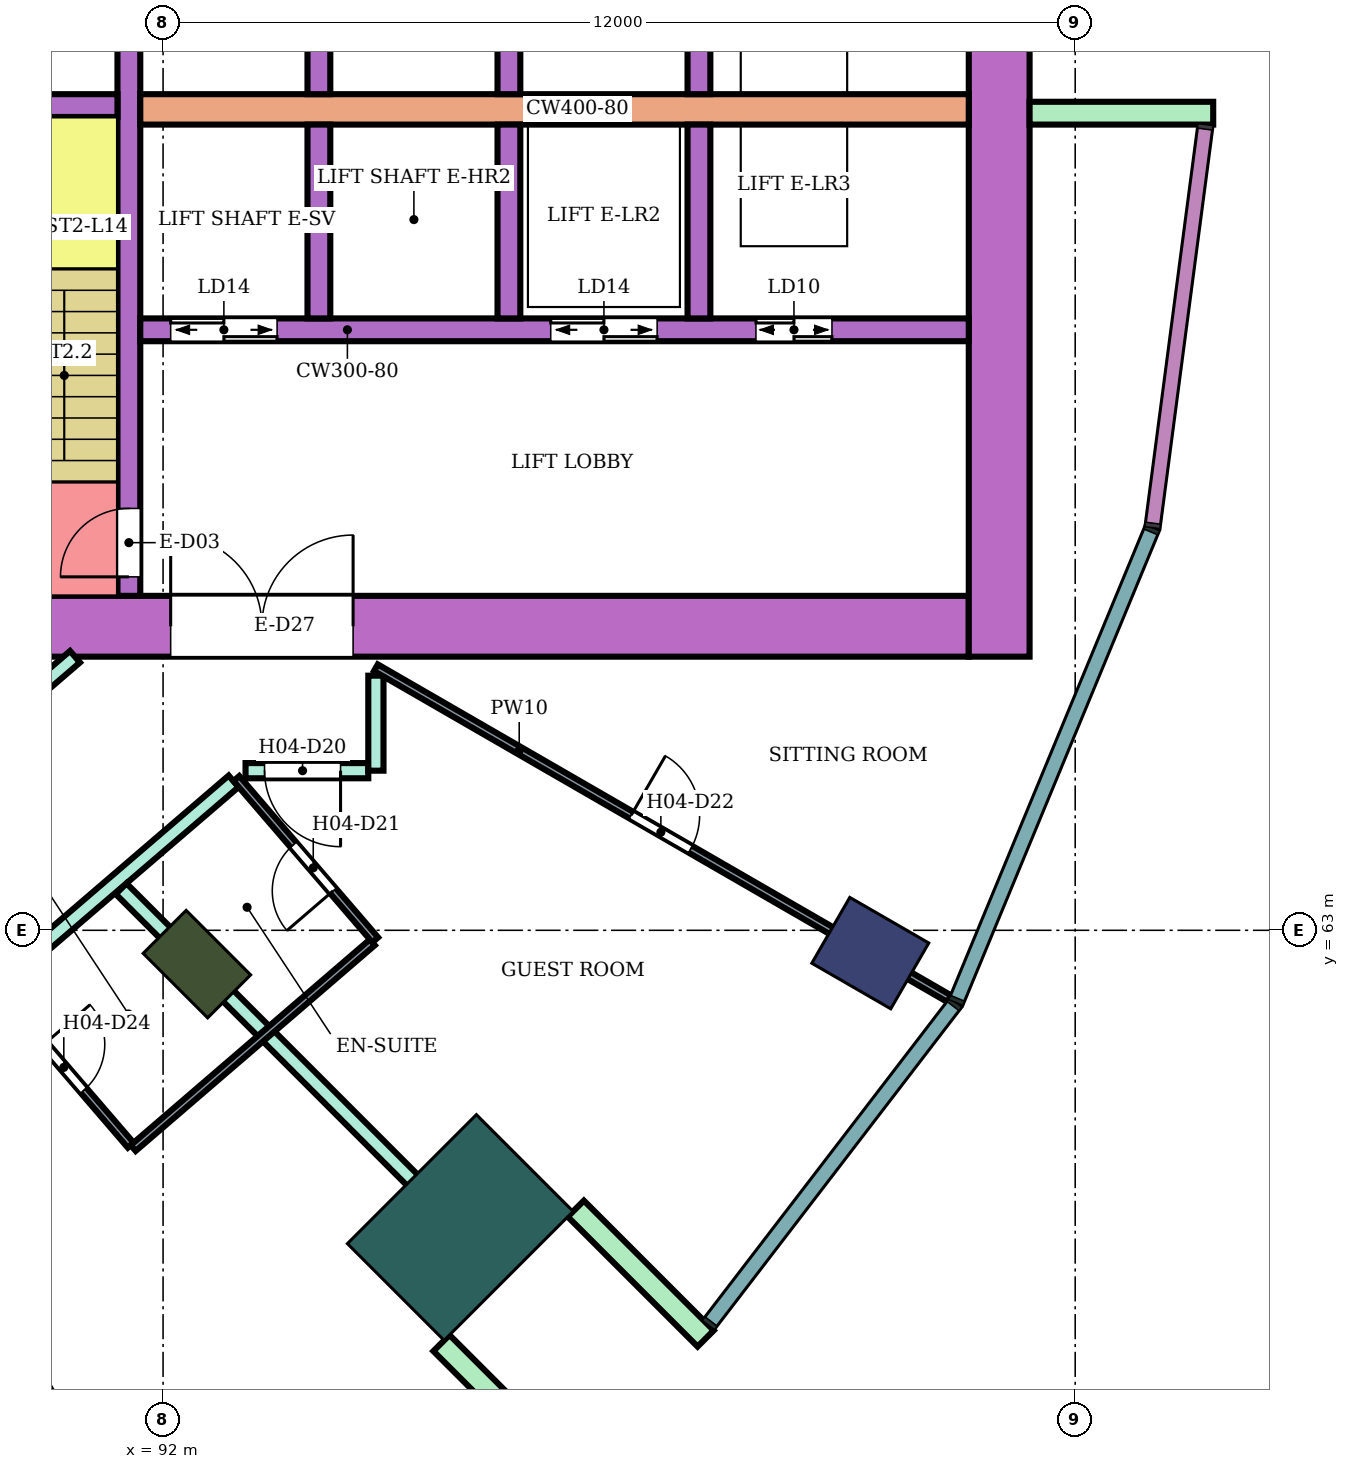
"""IFC4 building model, lengths in metres.
Left out: names, types, materials, properties, quantities, classifications, styles, units other than length and angle.
Written with IfcOpenShell. Run it as: python <this file> out.ifc"""

import sys

from ifc_helpers import new_model, si_unit, direction, frame, frame_2d, origin, origin_2d, place, context, subcontext, project, spatial, rectangle, extrude, element, fill, save


model = new_model("IFC4")
c1 = context("Model", 3, precision=1e-05, world=origin(), true_north=direction((0.0, 1.0)))
c2 = subcontext(c1, "Body", "Model", "MODEL_VIEW")
j1 = project(units=[si_unit("LENGTHUNIT", "METRE"), si_unit("PLANEANGLEUNIT", "RADIAN")], contexts=[c1])
p1 = place(None, origin())
s1 = spatial("IfcSite", under=j1, at=p1, CompositionType="ELEMENT")
p2 = place(p1, origin())
s2 = spatial("IfcBuilding", under=s1, at=p2, CompositionType="ELEMENT")
p3 = place(p2, frame((0.0, 0.0, 63.0)))
s3 = spatial("IfcBuildingStorey", under=s2, at=p3, CompositionType="ELEMENT", Elevation=63.0)
p4 = place(p3, frame((101.304, 62.7, 0.0), z_axis=(0.0, 0.0, 1.0), x_axis=(0.866025403784, -0.5, 0.0)))
e1 = element("IfcColumn", 1, at=p4, inside=s3, PredefinedType="COLUMN", context=c2, shape_type="SweptSolid", body=[
    extrude(rectangle(XDim=1.2, YDim=1.0, at=origin_2d()), origin(), (0.0, 0.0, 1.0), 3.8),
])
p5 = place(p3, frame((92.445, 62.555, 0.0), z_axis=(0.0, 0.0, 1.0), x_axis=(0.707106781187, -0.707106781187, 0.0)))
e2 = element("IfcColumn", 2, at=p5, inside=s3, PredefinedType="COLUMN", context=c2, shape_type="SweptSolid", body=[
    extrude(rectangle(XDim=1.2, YDim=0.8, at=origin_2d()), origin(), (0.0, 0.0, 1.0), 3.8),
])
p6 = place(p3, frame((95.91, 59.09, 0.0), z_axis=(0.0, 0.0, 1.0), x_axis=(0.707106781187, -0.707106781187, 0.0)))
e3 = element("IfcColumn", 3, at=p6, inside=s3, PredefinedType="COLUMN", context=c2, shape_type="SweptSolid", body=[
    extrude(rectangle(XDim=1.8, YDim=2.4, at=origin_2d()), origin(), (0.0, 0.0, 1.0), 3.8),
])
p7 = place(p3, frame((87.9, 67.0, 0.0), z_axis=(0.0, 0.0, 1.0), x_axis=(1.0, 0.0, 0.0)))
e4 = element("IfcWall", 4, at=p7, inside=s3, PredefinedType="SHEAR", context=c2, shape_type="SweptSolid", body=[
    extrude(rectangle(XDim=14.7, YDim=0.8, at=frame_2d((7.35, 0.0))), origin(), (0.0, 0.0, 1.0), 3.48),
])
p8 = place(p7, frame((4.2, 0.0, 0.0)))
e5 = element("IfcOpeningElement", 5, at=p8, cuts=e4, PredefinedType="OPENING", context=c2, shape_type="SweptSolid", body=[
    extrude(rectangle(XDim=2.4, YDim=2.4, at=frame_2d((1.2, 1.2))), frame((0.0, 0.41, 0.0), z_axis=(0.0, -1.0, 0.0), x_axis=(1.0, 0.0, 0.0)), (0.0, 0.0, 1.0), 0.82),
])
p9 = place(p3, frame((103.0, 66.6, 0.0), z_axis=(0.0, 0.0, 1.0), x_axis=(0.0, 1.0, 0.0)))
e6 = element("IfcWall", 6, at=p9, inside=s3, PredefinedType="SHEAR", context=c2, shape_type="SweptSolid", body=[
    extrude(rectangle(XDim=16.8, YDim=0.8, at=frame_2d((8.4, 0.0))), origin(), (0.0, 0.0, 1.0), 3.48),
])
p10 = place(p3, frame((91.55, 67.4, 0.0), z_axis=(0.0, 0.0, 1.0), x_axis=(0.0, 1.0, 0.0)))
e7 = element("IfcWall", 7, at=p10, inside=s3, PredefinedType="SHEAR", context=c2, shape_type="SweptSolid", body=[
    extrude(rectangle(XDim=7.6, YDim=0.3, at=frame_2d((3.8, 0.0))), origin(), (0.0, 0.0, 1.0), 3.48),
])
p11 = place(p10, frame((0.25, 0.0, 0.0)))
e8 = element("IfcOpeningElement", 8, at=p11, cuts=e7, PredefinedType="OPENING", context=c2, shape_type="SweptSolid", body=[
    extrude(rectangle(XDim=0.9, YDim=2.1, at=frame_2d((0.45, 1.05))), frame((0.0, 0.16, 0.0), z_axis=(0.0, -1.0, 0.0), x_axis=(1.0, 0.0, 0.0)), (0.0, 0.0, 1.0), 0.32),
])
p12 = place(p3, frame((88.35, 73.85, 0.0), z_axis=(0.0, 0.0, 1.0), x_axis=(1.0, 0.0, 0.0)))
e9 = element("IfcWall", 9, at=p12, inside=s3, PredefinedType="SHEAR", context=c2, shape_type="SweptSolid", body=[
    extrude(rectangle(XDim=3.05, YDim=0.3, at=frame_2d((1.525, 0.0))), origin(), (0.0, 0.0, 1.0), 3.48),
])
p13 = place(p3, frame((91.7, 73.8, 0.0), z_axis=(0.0, 0.0, 1.0), x_axis=(1.0, 0.0, 0.0)))
e10 = element("IfcWall", 10, at=p13, inside=s3, PredefinedType="SHEAR", context=c2, shape_type="SweptSolid", body=[
    extrude(rectangle(XDim=10.9, YDim=0.4, at=frame_2d((5.45, 0.0))), origin(), (0.0, 0.0, 1.0), 3.48),
])
p14 = place(p3, frame((91.7, 70.9, 0.0), z_axis=(0.0, 0.0, 1.0), x_axis=(1.0, 0.0, 0.0)))
e11 = element("IfcWall", 11, at=p14, inside=s3, PredefinedType="SHEAR", context=c2, shape_type="SweptSolid", body=[
    extrude(rectangle(XDim=10.9, YDim=0.3, at=frame_2d((5.45, 0.0))), origin(), (0.0, 0.0, 1.0), 3.48),
])
p15 = place(p14, frame((0.4, 0.0, 0.0)))
e12 = element("IfcOpeningElement", 12, at=p15, cuts=e11, PredefinedType="OPENING", context=c2, shape_type="SweptSolid", body=[
    extrude(rectangle(XDim=1.4, YDim=2.1, at=frame_2d((0.7, 1.05))), frame((0.0, 0.16, 0.0), z_axis=(0.0, -1.0, 0.0), x_axis=(1.0, 0.0, 0.0)), (0.0, 0.0, 1.0), 0.32),
])
p16 = place(p14, frame((5.4, 0.0, 0.0)))
e13 = element("IfcOpeningElement", 13, at=p16, cuts=e11, PredefinedType="OPENING", context=c2, shape_type="SweptSolid", body=[
    extrude(rectangle(XDim=1.4, YDim=2.1, at=frame_2d((0.7, 1.05))), frame((0.0, 0.16, 0.0), z_axis=(0.0, -1.0, 0.0), x_axis=(1.0, 0.0, 0.0)), (0.0, 0.0, 1.0), 0.32),
])
p17 = place(p14, frame((8.1, 0.0, 0.0)))
e14 = element("IfcOpeningElement", 14, at=p17, cuts=e11, PredefinedType="OPENING", context=c2, shape_type="SweptSolid", body=[
    extrude(rectangle(XDim=1.0, YDim=2.1, at=frame_2d((0.5, 1.05))), frame((0.0, 0.16, 0.0), z_axis=(0.0, -1.0, 0.0), x_axis=(1.0, 0.0, 0.0)), (0.0, 0.0, 1.0), 0.32),
])
for number, where, z_axis, x_axis in (
    (15, (94.05, 74.0, 0.0), (0.0, 0.0, 1.0), (0.0, 1.0, 0.0)),
    (16, (96.55, 74.0, 0.0), (0.0, 0.0, 1.0), (0.0, 1.0, 0.0)),
    (17, (99.05, 74.0, 0.0), (0.0, 0.0, 1.0), (0.0, 1.0, 0.0)),
    (18, (94.05, 71.05, 0.0), (0.0, 0.0, 1.0), (0.0, 1.0, 0.0)),
    (19, (96.55, 71.05, 0.0), (0.0, 0.0, 1.0), (0.0, 1.0, 0.0)),
    (20, (99.05, 71.05, 0.0), (0.0, 0.0, 1.0), (0.0, 1.0, 0.0)),
):
    element("IfcWall", number, at=place(p3, frame(where, z_axis=z_axis, x_axis=x_axis)), inside=s3, PredefinedType="SHEAR", context=c2, shape_type="SweptSolid", body=[
        extrude(rectangle(XDim=2.55, YDim=0.3, at=frame_2d((1.275, 0.0))), origin(), (0.0, 0.0, 1.0), 3.48),
    ])
for number, where, z_axis, x_axis in (
    (21, (103.4, 73.75, 0.0), (0.0, 0.0, 1.0), (1.0, 0.0, 0.0)),
    (22, (95.662, 57.57, 0.0), (0.0, 0.0, 1.0), (0.707, -0.707, 0.0)),
    (23, (97.43, 59.338, 0.0), (0.0, 0.0, 1.0), (0.707, -0.707, 0.0)),
):
    element("IfcWall", number, at=place(p3, frame(where, z_axis=z_axis, x_axis=x_axis)), inside=s3, PredefinedType="NOTDEFINED", context=c2, shape_type="SweptSolid", body=[
        extrude(rectangle(XDim=2.416, YDim=0.3, at=frame_2d((1.208, 0.0))), origin(), (0.0, 0.0, 1.0), 3.8),
    ])
p18 = place(p3, frame((86.877, 63.189, 0.0), z_axis=(0.0, 0.0, 1.0), x_axis=(0.758088707506, 0.652151448325, 0.0)))
e24 = element("IfcWall", 24, at=p18, inside=s3, PredefinedType="PARTITIONING", context=c2, shape_type="SweptSolid", body=[
    extrude(rectangle(XDim=5.229, YDim=0.2, at=frame_2d((2.615, 0.0))), origin(), (0.0, 0.0, 1.0), 3.35),
])
p19 = place(p3, frame((88.235, 60.931, 0.0), z_axis=(0.0, 0.0, 1.0), x_axis=(0.758799498714, 0.651324282329, 0.0)))
e25 = element("IfcWall", 25, at=p19, inside=s3, PredefinedType="PARTITIONING", context=c2, shape_type="SweptSolid", body=[
    extrude(rectangle(XDim=6.186, YDim=0.2, at=frame_2d((3.093, 0.0))), origin(), (0.0, 0.0, 1.0), 3.35),
])
p20 = place(p19, frame((0.43, 0.0, 0.0)))
e26 = element("IfcOpeningElement", 26, at=p20, cuts=e25, PredefinedType="OPENING", context=c2, shape_type="SweptSolid", body=[
    extrude(rectangle(XDim=1.0, YDim=2.1, at=frame_2d((0.5, 1.05))), frame((0.0, 0.11, 0.0), z_axis=(0.0, -1.0, 0.0), x_axis=(1.0, 0.0, 0.0)), (0.0, 0.0, 1.0), 0.22),
])
p21 = place(p3, frame((88.159, 60.863, 0.0), z_axis=(0.0, 0.0, 1.0), x_axis=(0.499935840196, -0.866062443296, 0.0)))
e27 = element("IfcWall", 27, at=p21, inside=s3, PredefinedType="PARTITIONING", context=c2, shape_type="SweptSolid", body=[
    extrude(rectangle(XDim=9.475, YDim=0.2, at=frame_2d((4.737, 0.0))), origin(), (0.0, 0.0, 1.0), 3.35),
])
p22 = place(p3, frame((91.448, 63.547, 0.0), z_axis=(0.0, 0.0, 1.0), x_axis=(0.706984810649, -0.707228730688, 0.0)))
e28 = element("IfcWall", 28, at=p22, inside=s3, PredefinedType="PARTITIONING", context=c2, shape_type="SweptSolid", body=[
    extrude(rectangle(XDim=7.006, YDim=0.2, at=frame_2d((3.503, 0.0))), origin(), (0.0, 0.0, 1.0), 3.35),
])
p23 = place(p3, frame((93.085, 65.1, 0.0), z_axis=(0.0, 0.0, 1.0), x_axis=(1.0, 0.0, 0.0)))
e29 = element("IfcWall", 29, at=p23, inside=s3, PredefinedType="PARTITIONING", context=c2, shape_type="SweptSolid", body=[
    extrude(rectangle(XDim=1.615, YDim=0.2, at=frame_2d((0.808, 0.0))), origin(), (0.0, 0.0, 1.0), 3.35),
])
p24 = place(p23, frame((0.25, 0.0, 0.0)))
e30 = element("IfcOpeningElement", 30, at=p24, cuts=e29, PredefinedType="OPENING", context=c2, shape_type="SweptSolid", body=[
    extrude(rectangle(XDim=1.0, YDim=2.1, at=frame_2d((0.5, 1.05))), frame((0.0, 0.11, 0.0), z_axis=(0.0, -1.0, 0.0), x_axis=(1.0, 0.0, 0.0)), (0.0, 0.0, 1.0), 0.22),
])
p25 = place(p3, frame((94.8, 65.1, 0.0), z_axis=(0.0, 0.0, 1.0), x_axis=(0.0, 1.0, 0.0)))
e31 = element("IfcWall", 31, at=p25, inside=s3, PredefinedType="PARTITIONING", context=c2, shape_type="SweptSolid", body=[
    extrude(rectangle(XDim=1.25, YDim=0.2, at=frame_2d((0.625, 0.0))), origin(), (0.0, 0.0, 1.0), 3.35),
])
p26 = place(p3, frame((89.846, 62.182, 0.0), z_axis=(0.0, 0.0, 1.0), x_axis=(0.652095405055, -0.758136915541, 0.0)))
e32 = element("IfcWall", 32, at=p26, inside=s3, PredefinedType="PARTITIONING", context=c2, shape_type="SweptSolid", body=[
    extrude(rectangle(XDim=2.65, YDim=0.1, at=frame_2d((1.325, 0.0))), origin(), (0.0, 0.0, 1.0), 3.35),
])
p27 = place(p26, frame((0.9, 0.0, 0.0)))
e33 = element("IfcOpeningElement", 33, at=p27, cuts=e32, PredefinedType="OPENING", context=c2, shape_type="SweptSolid", body=[
    extrude(rectangle(XDim=0.8, YDim=2.1, at=frame_2d((0.4, 1.05))), frame((0.0, 0.06, 0.0), z_axis=(0.0, -1.0, 0.0), x_axis=(1.0, 0.0, 0.0)), (0.0, 0.0, 1.0), 0.12),
])
p28 = place(p3, frame((91.607, 60.135, 0.0), z_axis=(0.0, 0.0, 1.0), x_axis=(0.758121792225, 0.65211298726, 0.0)))
e34 = element("IfcWall", 34, at=p28, inside=s3, PredefinedType="PARTITIONING", context=c2, shape_type="SweptSolid", body=[
    extrude(rectangle(XDim=4.15, YDim=0.1, at=frame_2d((2.075, 0.0))), origin(), (0.0, 0.0, 1.0), 3.35),
])
p29 = place(p3, frame((92.965, 64.997, 0.0), z_axis=(0.0, 0.0, 1.0), x_axis=(0.652104424393, -0.758129157655, 0.0)))
e35 = element("IfcWall", 35, at=p29, inside=s3, PredefinedType="PARTITIONING", context=c2, shape_type="SweptSolid", body=[
    extrude(rectangle(XDim=2.8, YDim=0.1, at=frame_2d((1.4, 0.0))), origin(), (0.0, 0.0, 1.0), 3.35),
])
p30 = place(p29, frame((1.15, 0.0, 0.0)))
e36 = element("IfcOpeningElement", 36, at=p30, cuts=e35, PredefinedType="OPENING", context=c2, shape_type="SweptSolid", body=[
    extrude(rectangle(XDim=0.8, YDim=2.1, at=frame_2d((0.4, 1.05))), frame((0.0, 0.06, 0.0), z_axis=(0.0, -1.0, 0.0), x_axis=(1.0, 0.0, 0.0)), (0.0, 0.0, 1.0), 0.12),
])
p31 = place(p3, frame((94.8, 66.455, 0.0), z_axis=(0.0, 0.0, 1.0), x_axis=(0.86602264145, -0.500004784474, 0.0)))
e37 = element("IfcWall", 37, at=p31, inside=s3, PredefinedType="PARTITIONING", context=c2, shape_type="SweptSolid", body=[
    extrude(rectangle(XDim=8.708, YDim=0.1, at=frame_2d((4.354, 0.0))), origin(), (0.0, 0.0, 1.0), 3.35),
])
p32 = place(p31, frame((3.879, 0.0, 0.0)))
e38 = element("IfcOpeningElement", 38, at=p32, cuts=e37, PredefinedType="OPENING", context=c2, shape_type="SweptSolid", body=[
    extrude(rectangle(XDim=0.9, YDim=2.1, at=frame_2d((0.45, 1.05))), frame((0.0, 0.06, 0.0), z_axis=(0.0, -1.0, 0.0), x_axis=(1.0, 0.0, 0.0)), (0.0, 0.0, 1.0), 0.12),
])
p33 = place(p24, frame((1.0, 0.0, 0.0), z_axis=(0.0, 0.0, 1.0), x_axis=(-1.0, 0.0, 0.0)))
e39 = element("IfcDoor", 39, at=p33, inside=s3, OperationType="SINGLE_SWING_LEFT", PredefinedType="DOOR", context=c2, shape_type="SweptSolid", body=[
    extrude(rectangle(XDim=1.0, YDim=2.1, at=frame_2d((0.5, 1.05))), frame((0.0, 0.025, 0.0), z_axis=(0.0, -1.0, 0.0), x_axis=(1.0, 0.0, 0.0)), (0.0, 0.0, 1.0), 0.05),
])
fill(e30, e39)
p34 = place(p30, frame((0.8, 0.0, 0.0), z_axis=(0.0, 0.0, 1.0), x_axis=(-1.0, 0.0, 0.0)))
e40 = element("IfcDoor", 40, at=p34, inside=s3, OperationType="SINGLE_SWING_LEFT", PredefinedType="DOOR", context=c2, shape_type="SweptSolid", body=[
    extrude(rectangle(XDim=0.8, YDim=2.1, at=frame_2d((0.4, 1.05))), frame((0.0, 0.025, 0.0), z_axis=(0.0, -1.0, 0.0), x_axis=(1.0, 0.0, 0.0)), (0.0, 0.0, 1.0), 0.05),
])
fill(e36, e40)
p35 = place(p32, origin())
e41 = element("IfcDoor", 41, at=p35, inside=s3, OperationType="SINGLE_SWING_LEFT", PredefinedType="DOOR", context=c2, shape_type="SweptSolid", body=[
    extrude(rectangle(XDim=0.9, YDim=2.1, at=frame_2d((0.45, 1.05))), frame((0.0, 0.025, 0.0), z_axis=(0.0, -1.0, 0.0), x_axis=(1.0, 0.0, 0.0)), (0.0, 0.0, 1.0), 0.05),
])
fill(e38, e41)
p36 = place(p27, origin())
e42 = element("IfcDoor", 42, at=p36, inside=s3, OperationType="SINGLE_SWING_LEFT", PredefinedType="DOOR", context=c2, shape_type="SweptSolid", body=[
    extrude(rectangle(XDim=0.8, YDim=2.1, at=frame_2d((0.4, 1.05))), frame((0.0, 0.025, 0.0), z_axis=(0.0, -1.0, 0.0), x_axis=(1.0, 0.0, 0.0)), (0.0, 0.0, 1.0), 0.05),
])
fill(e33, e42)
p37 = place(p11, origin())
e43 = element("IfcDoor", 43, at=p37, inside=s3, OperationType="SINGLE_SWING_LEFT", PredefinedType="DOOR", context=c2, shape_type="SweptSolid", body=[
    extrude(rectangle(XDim=0.9, YDim=2.1, at=frame_2d((0.45, 1.05))), frame((0.0, 0.025, 0.0), z_axis=(0.0, -1.0, 0.0), x_axis=(1.0, 0.0, 0.0)), (0.0, 0.0, 1.0), 0.05),
])
fill(e8, e43)
p38 = place(p15, origin())
e44 = element("IfcDoor", 44, at=p38, inside=s3, OperationType="DOUBLE_DOOR_SLIDING", PredefinedType="DOOR", context=c2, shape_type="SweptSolid", body=[
    extrude(rectangle(XDim=1.4, YDim=2.1, at=frame_2d((0.7, 1.05))), frame((0.0, 0.025, 0.0), z_axis=(0.0, -1.0, 0.0), x_axis=(1.0, 0.0, 0.0)), (0.0, 0.0, 1.0), 0.05),
])
fill(e12, e44)
p39 = place(p16, origin())
e45 = element("IfcDoor", 45, at=p39, inside=s3, OperationType="DOUBLE_DOOR_SLIDING", PredefinedType="DOOR", context=c2, shape_type="SweptSolid", body=[
    extrude(rectangle(XDim=1.4, YDim=2.1, at=frame_2d((0.7, 1.05))), frame((0.0, 0.025, 0.0), z_axis=(0.0, -1.0, 0.0), x_axis=(1.0, 0.0, 0.0)), (0.0, 0.0, 1.0), 0.05),
])
fill(e13, e45)
p40 = place(p17, origin())
e46 = element("IfcDoor", 46, at=p40, inside=s3, OperationType="DOUBLE_DOOR_SLIDING", PredefinedType="DOOR", context=c2, shape_type="SweptSolid", body=[
    extrude(rectangle(XDim=1.0, YDim=2.1, at=frame_2d((0.5, 1.05))), frame((0.0, 0.025, 0.0), z_axis=(0.0, -1.0, 0.0), x_axis=(1.0, 0.0, 0.0)), (0.0, 0.0, 1.0), 0.05),
])
fill(e14, e46)
p41 = place(p8, origin())
e47 = element("IfcDoor", 47, at=p41, inside=s3, OperationType="DOUBLE_DOOR_SINGLE_SWING", PredefinedType="DOOR", context=c2, shape_type="SweptSolid", body=[
    extrude(rectangle(XDim=2.4, YDim=2.4, at=frame_2d((1.2, 1.2))), frame((0.0, 0.025, 0.0), z_axis=(0.0, -1.0, 0.0), x_axis=(1.0, 0.0, 0.0)), (0.0, 0.0, 1.0), 0.05),
])
fill(e5, e47)
save(model, sys.argv[1])
